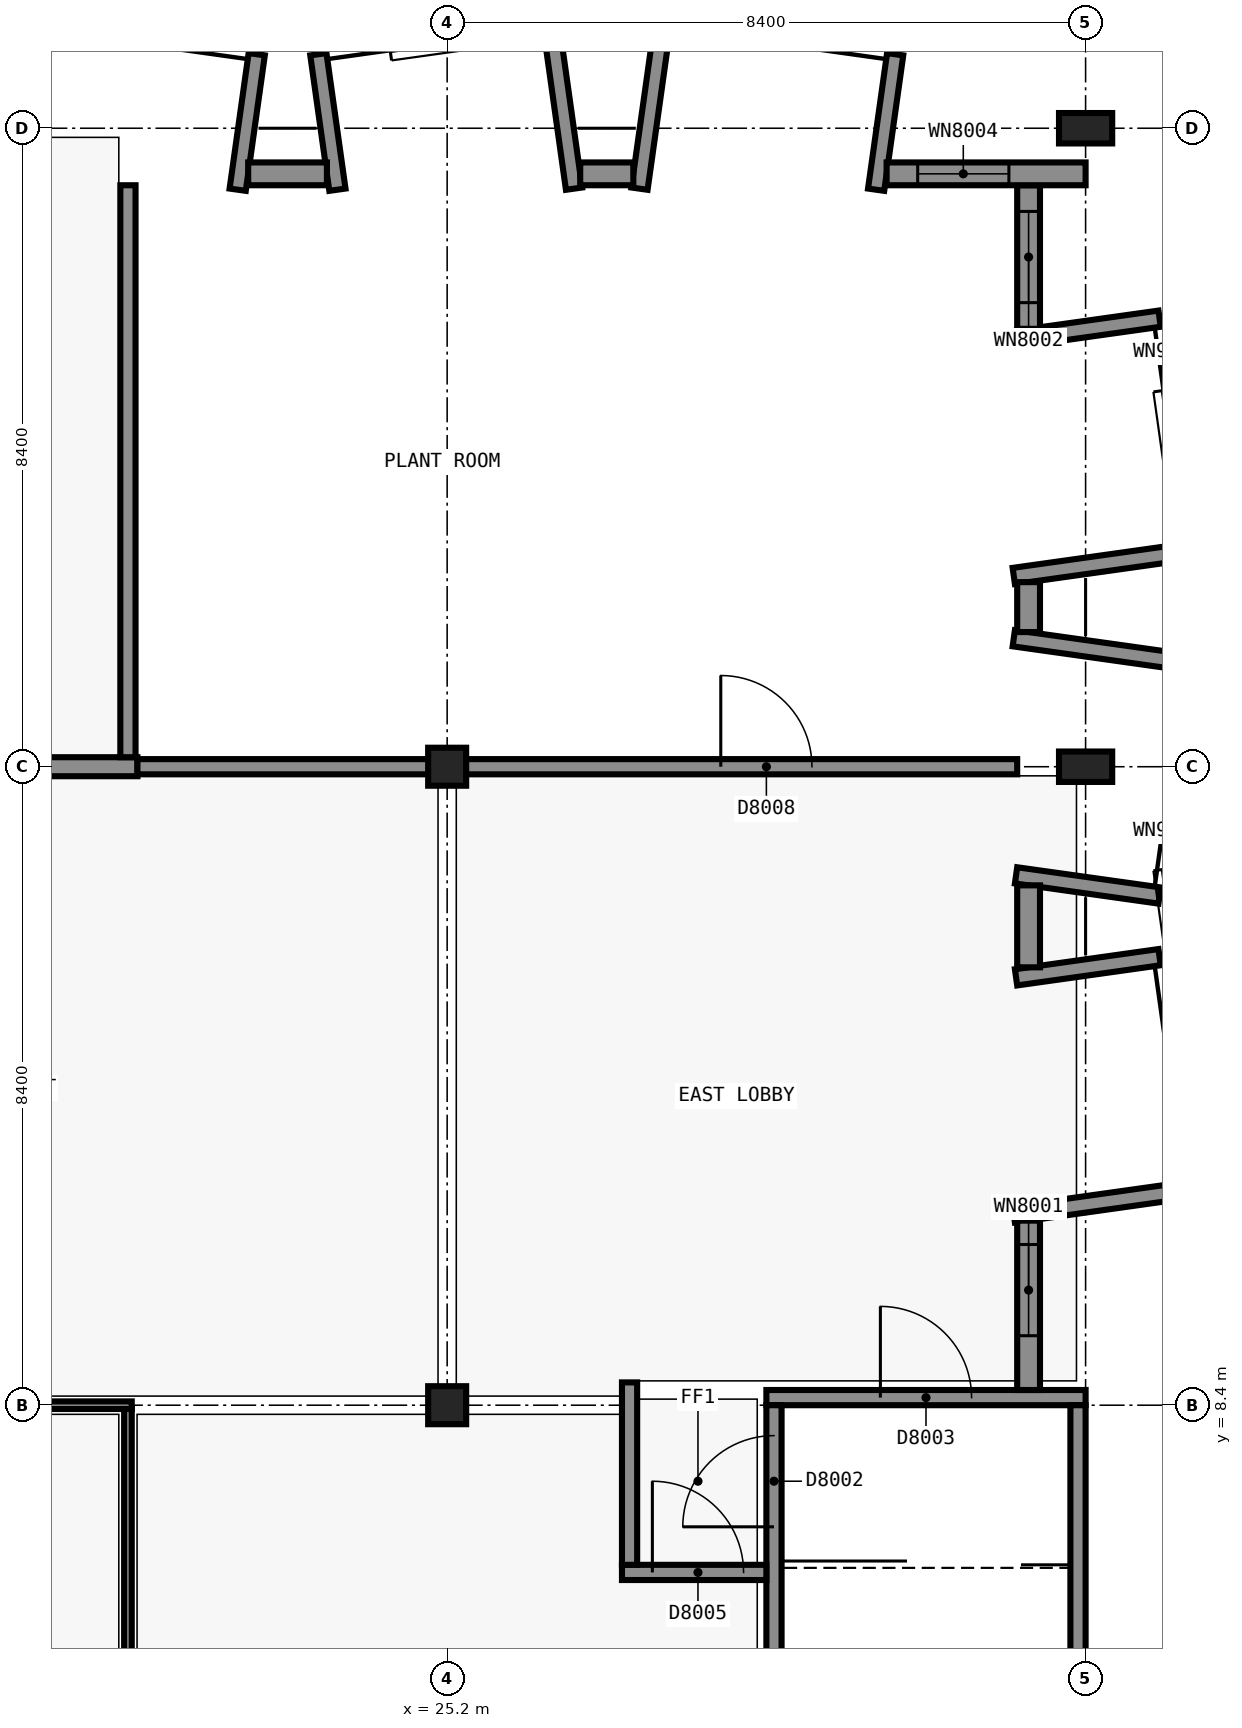
"""IFC4 building model, lengths in metres.
Left out: names, types, materials, properties, quantities, classifications, styles, units other than length and angle.
Written with IfcOpenShell. Run it as: python <this file> out.ifc"""

import sys

from ifc_helpers import new_model, si_unit, direction, frame, frame_2d, origin, origin_2d, place, context, subcontext, project, spatial, rectangle, extrude, element, fill, save


model = new_model("IFC4")
c1 = context("Model", 3, precision=1e-05, world=origin(), true_north=direction((0.0, 1.0)))
c2 = subcontext(c1, "Body", "Model", "MODEL_VIEW")
j1 = project(units=[si_unit("LENGTHUNIT", "METRE"), si_unit("PLANEANGLEUNIT", "RADIAN")], contexts=[c1])
p1 = place(None, origin())
s1 = spatial("IfcSite", under=j1, at=p1, CompositionType="ELEMENT")
p2 = place(p1, origin())
s2 = spatial("IfcBuilding", under=s1, at=p2, CompositionType="ELEMENT")
p3 = place(p2, frame((0.0, 0.0, 38.1)))
s3 = spatial("IfcBuildingStorey", under=s2, at=p3, CompositionType="ELEMENT", Elevation=38.1)
p4 = place(p3, frame((29.4, 8.5, 0.0), z_axis=(0.0, 0.0, 1.0), x_axis=(1.0, 0.0, 0.0)))
e1 = element("IfcWall", 1, at=p4, inside=s3, PredefinedType="SHEAR", context=c2, shape_type="SweptSolid", body=[
    extrude(rectangle(XDim=4.2, YDim=0.2, at=frame_2d((2.1, 0.0))), origin(), (0.0, 0.0, 1.0), 4.5),
])
p5 = place(p4, frame((1.5, 0.0, 0.0)))
e2 = element("IfcOpeningElement", 2, at=p5, cuts=e1, PredefinedType="OPENING", context=c2, shape_type="SweptSolid", body=[
    extrude(rectangle(XDim=1.2, YDim=2.1, at=frame_2d((0.6, 1.05))), frame((0.0, 0.11, 0.0), z_axis=(0.0, -1.0, 0.0), x_axis=(1.0, 0.0, 0.0)), (0.0, 0.0, 1.0), 0.22),
])
p6 = place(p3, frame((29.5, 0.2, 0.0), z_axis=(0.0, 0.0, 1.0), x_axis=(0.0, 1.0, 0.0)))
e3 = element("IfcWall", 3, at=p6, inside=s3, PredefinedType="SHEAR", context=c2, shape_type="SweptSolid", body=[
    extrude(rectangle(XDim=8.2, YDim=0.2, at=frame_2d((4.1, 0.0))), origin(), (0.0, 0.0, 1.0), 4.5),
])
p7 = place(p6, frame((6.6, 0.0, 0.0)))
e4 = element("IfcOpeningElement", 4, at=p7, cuts=e3, PredefinedType="OPENING", context=c2, shape_type="SweptSolid", body=[
    extrude(rectangle(XDim=1.2, YDim=2.1, at=frame_2d((0.6, 1.05))), frame((0.0, 0.11, 0.0), z_axis=(0.0, -1.0, 0.0), x_axis=(1.0, 0.0, 0.0)), (0.0, 0.0, 1.0), 0.22),
])
p8 = place(p3, frame((33.5, 8.4, 0.0), z_axis=(0.0, 0.0, 1.0), x_axis=(0.0, -1.0, 0.0)))
e5 = element("IfcWall", 5, at=p8, inside=s3, PredefinedType="SHEAR", context=c2, shape_type="SweptSolid", body=[
    extrude(rectangle(XDim=8.2, YDim=0.2, at=frame_2d((4.1, 0.0))), origin(), (0.0, 0.0, 1.0), 4.5),
])
for number, where, z_axis, x_axis in (
    (6, (25.2, 8.4, 0.0), (0.0, 0.0, 1.0), (1.0, 0.0, 0.0)),
    (7, (25.2, 16.8, 0.0), (0.0, 0.0, 1.0), (1.0, 0.0, 0.0)),
):
    element("IfcColumn", number, at=place(p3, frame(where, z_axis=z_axis, x_axis=x_axis)), inside=s3, PredefinedType="COLUMN", context=c2, shape_type="SweptSolid", body=[
        extrude(rectangle(XDim=0.5, YDim=0.5, at=origin_2d()), origin(), (0.0, 0.0, 1.0), 4.5),
    ])
for number, where, z_axis, x_axis in (
    (8, (33.6, 16.8, 0.0), (0.0, 0.0, 1.0), (0.0, 1.0, 0.0)),
    (9, (33.6, 25.2, 0.0), (0.0, 0.0, 1.0), (1.0, 0.0, 0.0)),
):
    element("IfcColumn", number, at=place(p3, frame(where, z_axis=z_axis, x_axis=x_axis)), inside=s3, PredefinedType="COLUMN", context=c2, shape_type="SweptSolid", body=[
        extrude(rectangle(XDim=0.7, YDim=0.4, at=origin_2d()), origin(), (0.0, 0.0, 1.0), 4.5),
    ])
p9 = place(p3, frame((32.655, 10.909, 0.0), z_axis=(0.0, 0.0, 1.0), x_axis=(0.990262124675, 0.139215388641, 0.0)))
e10 = element("IfcWall", 10, at=p9, inside=s3, PredefinedType="SOLIDWALL", context=c2, shape_type="SweptSolid", body=[
    extrude(rectangle(XDim=2.371, YDim=0.215, at=frame_2d((1.186, 0.0))), origin(), (0.0, 0.0, 1.0), 4.2),
])
for number, where, z_axis, x_axis in (
    (11, (32.685, 14.029, 0.0), (0.0, 0.0, 1.0), (0.99, 0.139, 0.0)),
    (12, (32.685, 15.371, 0.0), (0.0, 0.0, 1.0), (0.99, -0.139, 0.0)),
):
    element("IfcWall", number, at=place(p3, frame(where, z_axis=z_axis, x_axis=x_axis)), inside=s3, PredefinedType="SOLIDWALL", context=c2, shape_type="SweptSolid", body=[
        extrude(rectangle(XDim=1.907, YDim=0.215, at=frame_2d((0.954, 0.0))), origin(), (0.0, 0.0, 1.0), 4.2),
    ])
p10 = place(p3, frame((32.655, 18.49, 0.0), z_axis=(0.0, 0.0, 1.0), x_axis=(0.990262124675, -0.139215388641, 0.0)))
e13 = element("IfcWall", 13, at=p10, inside=s3, PredefinedType="SOLIDWALL", context=c2, shape_type="SweptSolid", body=[
    extrude(rectangle(XDim=2.371, YDim=0.215, at=frame_2d((1.186, 0.0))), origin(), (0.0, 0.0, 1.0), 4.2),
])
p11 = place(p3, frame((32.655, 19.31, 0.0), z_axis=(0.0, 0.0, 1.0), x_axis=(0.990276315141, 0.139114412161, 0.0)))
e14 = element("IfcWall", 14, at=p11, inside=s3, PredefinedType="SOLIDWALL", context=c2, shape_type="SweptSolid", body=[
    extrude(rectangle(XDim=2.371, YDim=0.215, at=frame_2d((1.186, 0.0))), origin(), (0.0, 0.0, 1.0), 4.2),
])
p12 = place(p3, frame((32.685, 22.429, 0.0), z_axis=(0.0, 0.0, 1.0), x_axis=(0.990269539441, 0.139162635989, 0.0)))
e15 = element("IfcWall", 15, at=p12, inside=s3, PredefinedType="SOLIDWALL", context=c2, shape_type="SweptSolid", body=[
    extrude(rectangle(XDim=1.907, YDim=0.215, at=frame_2d((0.954, 0.0))), origin(), (0.0, 0.0, 1.0), 4.2),
])
p13 = place(p3, frame((32.85, 10.828, 0.0), z_axis=(0.0, 0.0, 1.0), x_axis=(0.0, -1.0, 0.0)))
e16 = element("IfcWall", 16, at=p13, inside=s3, PredefinedType="SOLIDWALL", context=c2, shape_type="SweptSolid", body=[
    extrude(rectangle(XDim=2.228, YDim=0.3, at=frame_2d((1.114, 0.0))), origin(), (0.0, 0.0, 1.0), 4.2),
])
p14 = place(p13, frame((0.314, 0.0, 0.9)))
e17 = element("IfcOpeningElement", 17, at=p14, cuts=e16, PredefinedType="OPENING", context=c2, shape_type="SweptSolid", body=[
    extrude(rectangle(XDim=1.2, YDim=1.5, at=frame_2d((0.6, 0.75))), frame((0.0, 0.16, 0.0), z_axis=(0.0, -1.0, 0.0), x_axis=(1.0, 0.0, 0.0)), (0.0, 0.0, 1.0), 0.32),
])
p15 = place(p3, frame((32.85, 15.239, 0.0), z_axis=(0.0, 0.0, 1.0), x_axis=(0.0, -1.0, 0.0)))
e18 = element("IfcWall", 18, at=p15, inside=s3, PredefinedType="SOLIDWALL", context=c2, shape_type="SweptSolid", body=[
    extrude(rectangle(XDim=1.078, YDim=0.3, at=frame_2d((0.539, 0.0))), origin(), (0.0, 0.0, 1.0), 4.2),
])
p16 = place(p3, frame((32.85, 19.229, 0.0), z_axis=(0.0, 0.0, 1.0), x_axis=(0.0, -1.0, 0.0)))
e19 = element("IfcWall", 19, at=p16, inside=s3, PredefinedType="SOLIDWALL", context=c2, shape_type="SweptSolid", body=[
    extrude(rectangle(XDim=0.657, YDim=0.3, at=frame_2d((0.329, 0.0))), origin(), (0.0, 0.0, 1.0), 4.2),
])
p17 = place(p3, frame((32.85, 24.45, 0.0), z_axis=(0.0, 0.0, 1.0), x_axis=(0.0, -1.0, 0.0)))
e20 = element("IfcWall", 20, at=p17, inside=s3, PredefinedType="SOLIDWALL", context=c2, shape_type="SweptSolid", body=[
    extrude(rectangle(XDim=1.889, YDim=0.3, at=frame_2d((0.945, 0.0))), origin(), (0.0, 0.0, 1.0), 4.2),
])
p18 = place(p17, frame((0.344, 0.0, 0.9)))
e21 = element("IfcOpeningElement", 21, at=p18, cuts=e20, PredefinedType="OPENING", context=c2, shape_type="SweptSolid", body=[
    extrude(rectangle(XDim=1.2, YDim=1.5, at=frame_2d((0.6, 0.75))), frame((0.0, 0.16, 0.0), z_axis=(0.0, -1.0, 0.0), x_axis=(1.0, 0.0, 0.0)), (0.0, 0.0, 1.0), 0.32),
])
for number, where, z_axis, x_axis in (
    (22, (22.444, 24.391, 0.0), (0.0, 0.0, 1.0), (0.139, 0.99, 0.0)),
    (23, (23.756, 24.391, 0.0), (0.0, 0.0, 1.0), (-0.139, 0.99, 0.0)),
):
    element("IfcWall", number, at=place(p3, frame(where, z_axis=z_axis, x_axis=x_axis)), inside=s3, PredefinedType="SOLIDWALL", context=c2, shape_type="SweptSolid", body=[
        extrude(rectangle(XDim=1.8, YDim=0.215, at=frame_2d((0.9, 0.0))), origin(), (0.0, 0.0, 1.0), 4.2),
    ])
for number, where, z_axis, x_axis in (
    (24, (26.869, 24.405, 0.0), (0.0, 0.0, 1.0), (-0.139, 0.99, 0.0)),
    (25, (27.731, 24.405, 0.0), (0.0, 0.0, 1.0), (0.139, 0.99, 0.0)),
):
    element("IfcWall", number, at=place(p3, frame(where, z_axis=z_axis, x_axis=x_axis)), inside=s3, PredefinedType="SOLIDWALL", context=c2, shape_type="SweptSolid", body=[
        extrude(rectangle(XDim=2.219, YDim=0.215, at=frame_2d((1.11, 0.0))), origin(), (0.0, 0.0, 1.0), 4.2),
    ])
p19 = place(p3, frame((30.844, 24.391, 0.0), z_axis=(0.0, 0.0, 1.0), x_axis=(0.139161311926, 0.990269725511, 0.0)))
e26 = element("IfcWall", 26, at=p19, inside=s3, PredefinedType="SOLIDWALL", context=c2, shape_type="SweptSolid", body=[
    extrude(rectangle(XDim=1.8, YDim=0.215, at=frame_2d((0.9, 0.0))), origin(), (0.0, 0.0, 1.0), 4.2),
])
p20 = place(p3, frame((22.582, 24.6, 0.0), z_axis=(0.0, 0.0, 1.0), x_axis=(1.0, 0.0, 0.0)))
e27 = element("IfcWall", 27, at=p20, inside=s3, PredefinedType="SOLIDWALL", context=c2, shape_type="SweptSolid", body=[
    extrude(rectangle(XDim=1.036, YDim=0.3, at=frame_2d((0.518, 0.0))), origin(), (0.0, 0.0, 1.0), 4.2),
])
p21 = place(p3, frame((26.95, 24.6, 0.0), z_axis=(0.0, 0.0, 1.0), x_axis=(1.0, 0.0, 0.0)))
e28 = element("IfcWall", 28, at=p21, inside=s3, PredefinedType="SOLIDWALL", context=c2, shape_type="SweptSolid", body=[
    extrude(rectangle(XDim=0.699, YDim=0.3, at=frame_2d((0.35, 0.0))), origin(), (0.0, 0.0, 1.0), 4.2),
])
p22 = place(p3, frame((30.982, 24.6, 0.0), z_axis=(0.0, 0.0, 1.0), x_axis=(1.0, 0.0, 0.0)))
e29 = element("IfcWall", 29, at=p22, inside=s3, PredefinedType="SOLIDWALL", context=c2, shape_type="SweptSolid", body=[
    extrude(rectangle(XDim=2.618, YDim=0.3, at=frame_2d((1.309, 0.0))), origin(), (0.0, 0.0, 1.0), 4.2),
])
p23 = place(p22, frame((0.409, 0.0, 0.9)))
e30 = element("IfcOpeningElement", 30, at=p23, cuts=e29, PredefinedType="OPENING", context=c2, shape_type="SweptSolid", body=[
    extrude(rectangle(XDim=1.2, YDim=1.5, at=frame_2d((0.6, 0.75))), frame((0.0, 0.16, 0.0), z_axis=(0.0, -1.0, 0.0), x_axis=(1.0, 0.0, 0.0)), (0.0, 0.0, 1.0), 0.32),
])
p24 = place(p3, frame((8.275, 16.8, 0.0), z_axis=(0.0, 0.0, 1.0), x_axis=(1.0, 0.0, 0.0)))
e31 = element("IfcWall", 31, at=p24, inside=s3, PredefinedType="PARTITIONING", context=c2, shape_type="SweptSolid", body=[
    extrude(rectangle(XDim=12.85, YDim=0.25, at=frame_2d((6.425, 0.0))), origin(), (0.0, 0.0, 1.0), 3.4),
])
p25 = place(p24, frame((8.925, 0.0, 0.0)))
e32 = element("IfcOpeningElement", 32, at=p25, cuts=e31, PredefinedType="OPENING", context=c2, shape_type="SweptSolid", body=[
    extrude(rectangle(XDim=1.2, YDim=2.1, at=frame_2d((0.6, 1.05))), frame((0.0, 0.135, 0.0), z_axis=(0.0, -1.0, 0.0), x_axis=(1.0, 0.0, 0.0)), (0.0, 0.0, 1.0), 0.27),
])
p26 = place(p3, frame((21.125, 16.8, 0.0), z_axis=(0.0, 0.0, 1.0), x_axis=(1.0, 0.0, 0.0)))
e33 = element("IfcWall", 33, at=p26, inside=s3, PredefinedType="SOLIDWALL", context=c2, shape_type="SweptSolid", body=[
    extrude(rectangle(XDim=11.575, YDim=0.2, at=frame_2d((5.788, 0.0))), origin(), (0.0, 0.0, 1.0), 3.4),
])
p27 = place(p26, frame((7.675, 0.0, 0.0)))
e34 = element("IfcOpeningElement", 34, at=p27, cuts=e33, PredefinedType="OPENING", context=c2, shape_type="SweptSolid", body=[
    extrude(rectangle(XDim=1.2, YDim=2.1, at=frame_2d((0.6, 1.05))), frame((0.0, 0.11, 0.0), z_axis=(0.0, -1.0, 0.0), x_axis=(1.0, 0.0, 0.0)), (0.0, 0.0, 1.0), 0.22),
])
p28 = place(p3, frame((27.5, 6.2, 0.0), z_axis=(0.0, 0.0, 1.0), x_axis=(1.0, 0.0, 0.0)))
e35 = element("IfcWall", 35, at=p28, inside=s3, PredefinedType="SOLIDWALL", context=c2, shape_type="SweptSolid", body=[
    extrude(rectangle(XDim=1.9, YDim=0.2, at=frame_2d((0.95, 0.0))), origin(), (0.0, 0.0, 1.0), 4.2),
])
p29 = place(p28, frame((0.4, 0.0, 0.0)))
e36 = element("IfcOpeningElement", 36, at=p29, cuts=e35, PredefinedType="OPENING", context=c2, shape_type="SweptSolid", body=[
    extrude(rectangle(XDim=1.2, YDim=2.1, at=frame_2d((0.6, 1.05))), frame((0.0, 0.11, 0.0), z_axis=(0.0, -1.0, 0.0), x_axis=(1.0, 0.0, 0.0)), (0.0, 0.0, 1.0), 0.22),
])
p30 = place(p3, frame((21.0, 16.925, 0.0), z_axis=(0.0, 0.0, 1.0), x_axis=(0.0, 1.0, 0.0)))
e37 = element("IfcWall", 37, at=p30, inside=s3, PredefinedType="SOLIDWALL", context=c2, shape_type="SweptSolid", body=[
    extrude(rectangle(XDim=7.525, YDim=0.2, at=frame_2d((3.762, 0.0))), origin(), (0.0, 0.0, 1.0), 3.4),
])
p31 = place(p3, frame((27.6, 6.3, 0.0), z_axis=(0.0, 0.0, 1.0), x_axis=(0.0, 1.0, 0.0)))
e38 = element("IfcWall", 38, at=p31, inside=s3, PredefinedType="SOLIDWALL", context=c2, shape_type="SweptSolid", body=[
    extrude(rectangle(XDim=2.4, YDim=0.2, at=frame_2d((1.2, 0.0))), origin(), (0.0, 0.0, 1.0), 3.6),
])
p32 = place(p3, frame((12.675, 8.4, 0.0), z_axis=(0.0, 0.0, 1.0), x_axis=(1.0, 0.0, 0.0)))
e39 = element("IfcWall", 39, at=p32, inside=s3, PredefinedType="PARTITIONING", context=c2, shape_type="SweptSolid", body=[
    extrude(rectangle(XDim=8.375, YDim=0.1, at=frame_2d((4.188, 0.0))), origin(), (0.0, 0.0, 1.0), 3.4),
])
p33 = place(p3, frame((21.0, 0.75, 0.0), z_axis=(0.0, 0.0, 1.0), x_axis=(0.0, 1.0, 0.0)))
e40 = element("IfcWall", 40, at=p33, inside=s3, PredefinedType="PARTITIONING", context=c2, shape_type="SweptSolid", body=[
    extrude(rectangle(XDim=7.6, YDim=0.1, at=frame_2d((3.8, 0.0))), origin(), (0.0, 0.0, 1.0), 3.4),
])
p34 = place(p33, frame((2.95, 0.0, 0.0)))
e41 = element("IfcOpeningElement", 41, at=p34, cuts=e40, PredefinedType="OPENING", context=c2, shape_type="SweptSolid", body=[
    extrude(rectangle(XDim=1.0, YDim=2.1, at=frame_2d((0.5, 1.05))), frame((0.0, 0.06, 0.0), z_axis=(0.0, -1.0, 0.0), x_axis=(1.0, 0.0, 0.0)), (0.0, 0.0, 1.0), 0.12),
])
p35 = place(p14, origin())
e42 = element("IfcWindow", 42, at=p35, inside=s3, PartitioningType="SINGLE_PANEL", PredefinedType="WINDOW", context=c2, shape_type="SweptSolid", body=[
    extrude(rectangle(XDim=1.2, YDim=1.5, at=frame_2d((0.6, 0.75))), frame((0.0, 0.03, 0.0), z_axis=(0.0, -1.0, 0.0), x_axis=(1.0, 0.0, 0.0)), (0.0, 0.0, 1.0), 0.06),
])
fill(e17, e42)
p36 = place(p18, origin())
e43 = element("IfcWindow", 43, at=p36, inside=s3, PartitioningType="SINGLE_PANEL", PredefinedType="WINDOW", context=c2, shape_type="SweptSolid", body=[
    extrude(rectangle(XDim=1.2, YDim=1.5, at=frame_2d((0.6, 0.75))), frame((0.0, 0.03, 0.0), z_axis=(0.0, -1.0, 0.0), x_axis=(1.0, 0.0, 0.0)), (0.0, 0.0, 1.0), 0.06),
])
fill(e21, e43)
p37 = place(p23, origin())
e44 = element("IfcWindow", 44, at=p37, inside=s3, PartitioningType="SINGLE_PANEL", PredefinedType="WINDOW", context=c2, shape_type="SweptSolid", body=[
    extrude(rectangle(XDim=1.2, YDim=1.5, at=frame_2d((0.6, 0.75))), frame((0.0, 0.03, 0.0), z_axis=(0.0, -1.0, 0.0), x_axis=(1.0, 0.0, 0.0)), (0.0, 0.0, 1.0), 0.06),
])
fill(e30, e44)
p38 = place(p2, frame((0.0, 0.0, 42.6)))
p39 = place(p38, frame((35.174, 11.351, 0.0), z_axis=(0.0, 0.0, 1.0), x_axis=(-0.139163297052, 0.990269446541, 0.0)))
p40 = place(p39, frame((2.935, 0.0, 0.6)))
p41 = place(p40, origin())
e45 = element("IfcWindow", 45, at=p41, inside=s3, PartitioningType="SINGLE_PANEL", PredefinedType="WINDOW", context=c2, shape_type="SweptSolid", body=[
    extrude(rectangle(XDim=1.2, YDim=1.8, at=frame_2d((0.6, 0.9))), frame((0.0, 0.03, 0.0), z_axis=(0.0, -1.0, 0.0), x_axis=(1.0, 0.0, 0.0)), (0.0, 0.0, 1.0), 0.06),
])
p42 = place(p38, frame((34.882, 19.731, 0.0), z_axis=(0.0, 0.0, 1.0), x_axis=(-0.139170109801, 0.990268489117, 0.0)))
p43 = place(p42, frame((0.835, 0.0, 0.6)))
p44 = place(p43, origin())
e46 = element("IfcWindow", 46, at=p44, inside=s3, PartitioningType="SINGLE_PANEL", PredefinedType="WINDOW", context=c2, shape_type="SweptSolid", body=[
    extrude(rectangle(XDim=1.2, YDim=1.8, at=frame_2d((0.6, 0.9))), frame((0.0, 0.03, 0.0), z_axis=(0.0, -1.0, 0.0), x_axis=(1.0, 0.0, 0.0)), (0.0, 0.0, 1.0), 0.06),
])
p45 = place(p38, frame((23.627, 26.082, 0.0), z_axis=(0.0, 0.0, 1.0), x_axis=(0.990268489117, 0.139170109801, 0.0)))
p46 = place(p45, frame((0.835, 0.0, 0.6)))
p47 = place(p46, origin())
e47 = element("IfcWindow", 47, at=p47, inside=s3, PartitioningType="SINGLE_PANEL", PredefinedType="WINDOW", context=c2, shape_type="SweptSolid", body=[
    extrude(rectangle(XDim=1.2, YDim=1.8, at=frame_2d((0.6, 0.9))), frame((0.0, 0.03, 0.0), z_axis=(0.0, -1.0, 0.0), x_axis=(1.0, 0.0, 0.0)), (0.0, 0.0, 1.0), 0.06),
])
p48 = place(p7, origin())
e48 = element("IfcDoor", 48, at=p48, inside=s3, OperationType="SINGLE_SWING_RIGHT", PredefinedType="DOOR", context=c2, shape_type="SweptSolid", body=[
    extrude(rectangle(XDim=1.2, YDim=2.1, at=frame_2d((0.6, 1.05))), frame((0.0, 0.025, 0.0), z_axis=(0.0, -1.0, 0.0), x_axis=(1.0, 0.0, 0.0)), (0.0, 0.0, 1.0), 0.05),
])
fill(e4, e48)
p49 = place(p5, origin())
e49 = element("IfcDoor", 49, at=p49, inside=s3, OperationType="SINGLE_SWING_RIGHT", PredefinedType="DOOR", context=c2, shape_type="SweptSolid", body=[
    extrude(rectangle(XDim=1.2, YDim=2.1, at=frame_2d((0.6, 1.05))), frame((0.0, 0.025, 0.0), z_axis=(0.0, -1.0, 0.0), x_axis=(1.0, 0.0, 0.0)), (0.0, 0.0, 1.0), 0.05),
])
fill(e2, e49)
p50 = place(p29, origin())
e50 = element("IfcDoor", 50, at=p50, inside=s3, OperationType="SINGLE_SWING_RIGHT", PredefinedType="DOOR", context=c2, shape_type="SweptSolid", body=[
    extrude(rectangle(XDim=1.2, YDim=2.1, at=frame_2d((0.6, 1.05))), frame((0.0, 0.025, 0.0), z_axis=(0.0, -1.0, 0.0), x_axis=(1.0, 0.0, 0.0)), (0.0, 0.0, 1.0), 0.05),
])
fill(e36, e50)
p51 = place(p27, origin())
e51 = element("IfcDoor", 51, at=p51, inside=s3, OperationType="SINGLE_SWING_LEFT", PredefinedType="DOOR", context=c2, shape_type="SweptSolid", body=[
    extrude(rectangle(XDim=1.2, YDim=2.1, at=frame_2d((0.6, 1.05))), frame((0.0, 0.025, 0.0), z_axis=(0.0, -1.0, 0.0), x_axis=(1.0, 0.0, 0.0)), (0.0, 0.0, 1.0), 0.05),
])
fill(e34, e51)
save(model, sys.argv[1])
